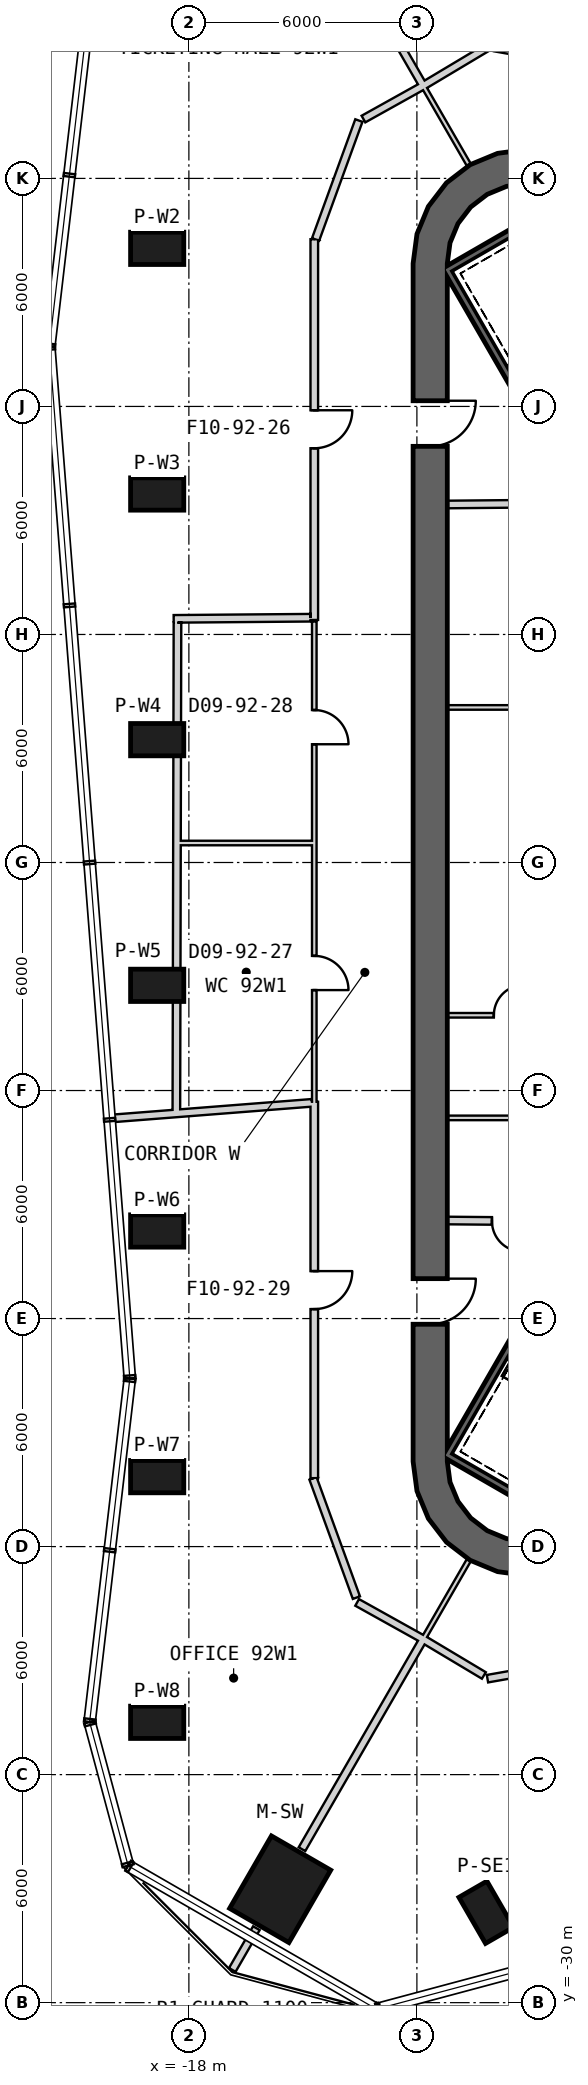
"""IFC4 building model, lengths in metres.
Left out: names, types, materials, properties, quantities, classifications, styles, units other than length and angle.
Written with IfcOpenShell. Run it as: python <this file> out.ifc"""

import sys

from ifc_helpers import new_model, si_unit, direction, frame, frame_2d, origin, origin_2d, place, context, subcontext, project, spatial, polyline, rectangle, outline, extrude, element, fill, save


model = new_model("IFC4")
c1 = context("Model", 3, precision=1e-05, world=origin(), true_north=direction((0.0, 1.0)))
c2 = subcontext(c1, "Body", "Model", "MODEL_VIEW")
j1 = project(units=[si_unit("LENGTHUNIT", "METRE"), si_unit("PLANEANGLEUNIT", "RADIAN")], contexts=[c1])
p1 = place(None, origin())
s1 = spatial("IfcSite", under=j1, at=p1, CompositionType="ELEMENT")
p2 = place(p1, origin())
s2 = spatial("IfcBuilding", under=s1, at=p2, CompositionType="ELEMENT")
p3 = place(p2, frame((0.0, 0.0, 404.8)))
s3 = spatial("IfcBuildingStorey", under=s2, at=p3, CompositionType="ELEMENT", Elevation=404.8)
p4 = place(p3, frame((-15.598, -27.016, 0.0), z_axis=(0.0, 0.0, 1.0), x_axis=(-0.5, -0.866025403784, 0.0)))
e1 = element("IfcColumn", 1, at=p4, inside=s3, PredefinedType="COLUMN", context=c2, shape_type="SweptSolid", body=[
    extrude(rectangle(XDim=2.2, YDim=1.8, at=origin_2d()), origin(), (0.0, 0.0, 1.0), 5.25),
])
for number, where, z_axis, x_axis in (
    (2, (-18.834, 16.16, 0.0), (0.0, 0.0, 1.0), (-1.0, 0.0, 0.0)),
    (3, (-18.834, 9.696, 0.0), (0.0, 0.0, 1.0), (-1.0, 0.0, 0.0)),
    (4, (-18.834, 3.232, 0.0), (0.0, 0.0, 1.0), (-1.0, 0.0, 0.0)),
    (5, (-18.834, -3.232, 0.0), (0.0, 0.0, 1.0), (-1.0, 0.0, 0.0)),
    (6, (-18.834, -9.696, 0.0), (0.0, 0.0, 1.0), (-1.0, 0.0, 0.0)),
    (7, (-18.834, -16.16, 0.0), (0.0, 0.0, 1.0), (-1.0, 0.0, 0.0)),
    (8, (-18.834, -22.624, 0.0), (0.0, 0.0, 1.0), (-1.0, 0.0, 0.0)),
    (9, (-10.176, -27.623, 0.0), (0.0, 0.0, 1.0), (0.5, -0.866, 0.0)),
):
    element("IfcColumn", number, at=place(p3, frame(where, z_axis=z_axis, x_axis=x_axis)), inside=s3, PredefinedType="COLUMN", context=c2, shape_type="SweptSolid", body=[
        extrude(rectangle(XDim=1.4, YDim=0.85, at=origin_2d()), origin(), (0.0, 0.0, 1.0), 5.25),
    ])
p5 = place(p3, frame((-11.65, 15.762, 0.0), z_axis=(0.0, 0.0, 1.0), x_axis=(0.0, -1.0, 0.0)))
e10 = element("IfcWall", 10, at=p5, inside=s3, PredefinedType="SHEAR", context=c2, shape_type="SweptSolid", body=[
    extrude(rectangle(XDim=31.523, YDim=0.9, at=frame_2d((15.762, 0.0))), origin(), (0.0, 0.0, 1.0), 5.5),
])
p6 = place(p5, frame((3.612, 0.0, 0.0)))
e11 = element("IfcOpeningElement", 11, at=p6, cuts=e10, PredefinedType="OPENING", context=c2, shape_type="SweptSolid", body=[
    extrude(rectangle(XDim=1.2, YDim=2.4, at=frame_2d((0.6, 1.2))), frame((0.0, 0.46, 0.0), z_axis=(0.0, -1.0, 0.0), x_axis=(1.0, 0.0, 0.0)), (0.0, 0.0, 1.0), 0.92),
])
p7 = place(p5, frame((26.712, 0.0, 0.0)))
e12 = element("IfcOpeningElement", 12, at=p7, cuts=e10, PredefinedType="OPENING", context=c2, shape_type="SweptSolid", body=[
    extrude(rectangle(XDim=1.2, YDim=2.4, at=frame_2d((0.6, 1.2))), frame((0.0, 0.46, 0.0), z_axis=(0.0, -1.0, 0.0), x_axis=(1.0, 0.0, 0.0)), (0.0, 0.0, 1.0), 0.92),
])
p8 = place(p3, origin())
e13 = element("IfcWall", 13, at=p8, inside=s3, PredefinedType="SHEAR", context=c2, shape_type="SweptSolid", body=[
    extrude(outline(polyline([(-7.6, 18.36), (-8.323, 18.659), (-9.1, 18.762), (-9.876, 18.659), (-10.6, 18.36), (-11.221, 17.883), (-11.698, 17.262), (-11.998, 16.538), (-12.1, 15.762), (-11.2, 15.762), (-11.128, 16.305), (-10.919, 16.812), (-10.585, 17.247), (-10.15, 17.58), (-9.644, 17.79), (-9.1, 17.862), (-8.556, 17.79), (-8.05, 17.58), (-7.6, 18.36)])), origin(), (0.0, 0.0, 1.0), 5.5),
])
p9 = place(p3, origin())
e14 = element("IfcWall", 14, at=p9, inside=s3, PredefinedType="SHEAR", context=c2, shape_type="SweptSolid", body=[
    extrude(outline(polyline([(-12.1, -15.762), (-11.998, -16.538), (-11.698, -17.262), (-11.221, -17.883), (-10.6, -18.36), (-9.876, -18.659), (-9.1, -18.762), (-8.323, -18.659), (-7.6, -18.36), (-8.05, -17.58), (-8.556, -17.79), (-9.1, -17.862), (-9.644, -17.79), (-10.15, -17.58), (-10.585, -17.247), (-10.919, -16.812), (-11.128, -16.305), (-11.2, -15.762), (-12.1, -15.762)])), origin(), (0.0, 0.0, 1.0), 5.5),
])
p10 = place(p3, frame((-11.245, 15.678, -0.3), z_axis=(0.0, 0.0, 1.0), x_axis=(0.499977274689, -0.866038523851, 0.0)))
e15 = element("IfcWall", 15, at=p10, inside=s3, PredefinedType="SHEAR", context=c2, shape_type="SweptSolid", body=[
    extrude(rectangle(XDim=8.1, YDim=0.2, at=frame_2d((4.05, 0.0))), origin(), (0.0, 0.0, 1.0), 5.55),
])
for number, where, z_axis, x_axis in (
    (16, (-7.818, 17.541, -0.3), (0.0, 0.0, 1.0), (-0.866, -0.5, 0.0)),
    (17, (-11.282, -15.541, -0.3), (0.0, 0.0, 1.0), (0.866, -0.5, 0.0)),
):
    element("IfcWall", number, at=place(p3, frame(where, z_axis=z_axis, x_axis=x_axis)), inside=s3, PredefinedType="SHEAR", context=c2, shape_type="SweptSolid", body=[
        extrude(rectangle(XDim=3.8, YDim=0.2, at=frame_2d((1.9, 0.0))), origin(), (0.0, 0.0, 1.0), 5.55),
    ])
p11 = place(p3, frame((-7.196, -8.663, -0.3), z_axis=(0.0, 0.0, 1.0), x_axis=(-0.499997992926, -0.866026562566, 0.0)))
e18 = element("IfcWall", 18, at=p11, inside=s3, PredefinedType="SHEAR", context=c2, shape_type="SweptSolid", body=[
    extrude(rectangle(XDim=7.9, YDim=0.2, at=frame_2d((3.95, 0.0))), origin(), (0.0, 0.0, 1.0), 5.55),
])
p12 = place(p3, frame((-7.95, 4.08, 0.0), z_axis=(0.0, 0.0, 1.0), x_axis=(-1.0, 0.0, 0.0)))
e19 = element("IfcWall", 19, at=p12, inside=s3, PredefinedType="PARTITIONING", context=c2, shape_type="SweptSolid", body=[
    extrude(rectangle(XDim=3.25, YDim=0.12, at=frame_2d((1.625, 0.0))), origin(), (0.0, 0.0, 1.0), 5.25),
])
p13 = place(p3, frame((-7.85, 9.451, 0.0), z_axis=(0.0, 0.0, 1.0), x_axis=(-0.999957167047, -0.009255488683, 0.0)))
e20 = element("IfcWall", 20, at=p13, inside=s3, PredefinedType="PARTITIONING", context=c2, shape_type="SweptSolid", body=[
    extrude(rectangle(XDim=3.35, YDim=0.2, at=frame_2d((1.675, 0.0))), origin(), (0.0, 0.0, 1.0), 5.25),
])
p14 = place(p3, frame((-11.2, -4.02, 0.0), z_axis=(0.0, 0.0, 1.0), x_axis=(1.0, 0.0, 0.0)))
e21 = element("IfcWall", 21, at=p14, inside=s3, PredefinedType="PARTITIONING", context=c2, shape_type="SweptSolid", body=[
    extrude(rectangle(XDim=3.25, YDim=0.12, at=frame_2d((1.625, 0.0))), origin(), (0.0, 0.0, 1.0), 5.25),
])
p15 = place(p14, frame((1.225, 0.0, 0.0)))
e22 = element("IfcOpeningElement", 22, at=p15, cuts=e21, PredefinedType="OPENING", context=c2, shape_type="SweptSolid", body=[
    extrude(rectangle(XDim=0.8, YDim=2.1, at=frame_2d((0.4, 1.05))), frame((0.0, 0.07, 0.0), z_axis=(0.0, -1.0, 0.0), x_axis=(1.0, 0.0, 0.0)), (0.0, 0.0, 1.0), 0.14),
])
p16 = place(p3, frame((-11.2, -6.72, 0.0), z_axis=(0.0, 0.0, 1.0), x_axis=(1.0, 0.0, 0.0)))
e23 = element("IfcWall", 23, at=p16, inside=s3, PredefinedType="PARTITIONING", context=c2, shape_type="SweptSolid", body=[
    extrude(rectangle(XDim=3.25, YDim=0.12, at=frame_2d((1.625, 0.0))), origin(), (0.0, 0.0, 1.0), 5.25),
])
p17 = place(p3, frame((-11.2, -9.42, 0.0), z_axis=(0.0, 0.0, 1.0), x_axis=(0.999957467379, -0.009222983926, 0.0)))
e24 = element("IfcWall", 24, at=p17, inside=s3, PredefinedType="PARTITIONING", context=c2, shape_type="SweptSolid", body=[
    extrude(rectangle(XDim=3.15, YDim=0.2, at=frame_2d((1.575, 0.0))), origin(), (0.0, 0.0, 1.0), 5.25),
])
p18 = place(p17, frame((1.175, 0.0, 0.0)))
e25 = element("IfcOpeningElement", 25, at=p18, cuts=e24, PredefinedType="OPENING", context=c2, shape_type="SweptSolid", body=[
    extrude(rectangle(XDim=0.8, YDim=2.1, at=frame_2d((0.4, 1.05))), frame((0.0, 0.11, 0.0), z_axis=(0.0, -1.0, 0.0), x_axis=(1.0, 0.0, 0.0)), (0.0, 0.0, 1.0), 0.22),
])
p19 = place(p3, frame((-14.7, 16.399, 0.0), z_axis=(0.0, 0.0, 1.0), x_axis=(0.0, -1.0, 0.0)))
e26 = element("IfcWall", 26, at=p19, inside=s3, PredefinedType="PARTITIONING", context=c2, shape_type="SweptSolid", body=[
    extrude(rectangle(XDim=10.018, YDim=0.2, at=frame_2d((5.009, 0.0))), origin(), (0.0, 0.0, 1.0), 5.25),
])
p20 = place(p19, frame((4.5, 0.0, 0.0)))
e27 = element("IfcOpeningElement", 27, at=p20, cuts=e26, PredefinedType="OPENING", context=c2, shape_type="SweptSolid", body=[
    extrude(rectangle(XDim=1.0, YDim=2.1, at=frame_2d((0.5, 1.05))), frame((0.0, 0.11, 0.0), z_axis=(0.0, -1.0, 0.0), x_axis=(1.0, 0.0, 0.0)), (0.0, 0.0, 1.0), 0.22),
])
p21 = place(p3, frame((-14.7, -6.295, 0.0), z_axis=(0.0, 0.0, 1.0), x_axis=(0.0, -1.0, 0.0)))
e28 = element("IfcWall", 28, at=p21, inside=s3, PredefinedType="PARTITIONING", context=c2, shape_type="SweptSolid", body=[
    extrude(rectangle(XDim=9.905, YDim=0.2, at=frame_2d((4.952, 0.0))), origin(), (0.0, 0.0, 1.0), 5.25),
])
p22 = place(p21, frame((4.456, 0.0, 0.0)))
e29 = element("IfcOpeningElement", 29, at=p22, cuts=e28, PredefinedType="OPENING", context=c2, shape_type="SweptSolid", body=[
    extrude(rectangle(XDim=1.0, YDim=2.1, at=frame_2d((0.5, 1.05))), frame((0.0, 0.11, 0.0), z_axis=(0.0, -1.0, 0.0), x_axis=(1.0, 0.0, 0.0)), (0.0, 0.0, 1.0), 0.22),
])
p23 = place(p3, frame((-13.527, 19.522, 0.0), z_axis=(0.0, 0.0, 1.0), x_axis=(-0.341978542333, -0.939707761266, 0.0)))
e30 = element("IfcWall", 30, at=p23, inside=s3, PredefinedType="PARTITIONING", context=c2, shape_type="SweptSolid", body=[
    extrude(rectangle(XDim=3.33, YDim=0.2, at=frame_2d((1.665, 0.0))), origin(), (0.0, 0.0, 1.0), 5.25),
])
p24 = place(p3, frame((-11.808, 20.452, 0.0), z_axis=(0.0, 0.0, 1.0), x_axis=(-0.873514477635, -0.486798169021, 0.0)))
e31 = element("IfcWall", 31, at=p24, inside=s3, PredefinedType="PARTITIONING", context=c2, shape_type="SweptSolid", body=[
    extrude(rectangle(XDim=1.83, YDim=0.2, at=frame_2d((0.915, 0.0))), origin(), (0.0, 0.0, 1.0), 3.02),
])
p25 = place(p3, frame((-14.7, 6.341, 0.0), z_axis=(0.0, 0.0, 1.0), x_axis=(0.0, -1.0, 0.0)))
e32 = element("IfcWall", 32, at=p25, inside=s3, PredefinedType="PARTITIONING", context=c2, shape_type="SweptSolid", body=[
    extrude(rectangle(XDim=5.829, YDim=0.12, at=frame_2d((2.914, 0.0))), origin(), (0.0, 0.0, 1.0), 5.25),
])
p26 = place(p25, frame((2.33, 0.0, 0.0)))
e33 = element("IfcOpeningElement", 33, at=p26, cuts=e32, PredefinedType="OPENING", context=c2, shape_type="SweptSolid", body=[
    extrude(rectangle(XDim=0.9, YDim=2.1, at=frame_2d((0.45, 1.05))), frame((0.0, 0.07, 0.0), z_axis=(0.0, -1.0, 0.0), x_axis=(1.0, 0.0, 0.0)), (0.0, 0.0, 1.0), 0.14),
])
p27 = place(p3, frame((-14.7, 0.513, 0.0), z_axis=(0.0, 0.0, 1.0), x_axis=(0.0, -1.0, 0.0)))
e34 = element("IfcWall", 34, at=p27, inside=s3, PredefinedType="PARTITIONING", context=c2, shape_type="SweptSolid", body=[
    extrude(rectangle(XDim=6.808, YDim=0.12, at=frame_2d((3.404, 0.0))), origin(), (0.0, 0.0, 1.0), 5.25),
])
p28 = place(p27, frame((2.97, 0.0, 0.0)))
e35 = element("IfcOpeningElement", 35, at=p28, cuts=e34, PredefinedType="OPENING", context=c2, shape_type="SweptSolid", body=[
    extrude(rectangle(XDim=0.9, YDim=2.1, at=frame_2d((0.45, 1.05))), frame((0.0, 0.07, 0.0), z_axis=(0.0, -1.0, 0.0), x_axis=(1.0, 0.0, 0.0)), (0.0, 0.0, 1.0), 0.14),
])
p29 = place(p3, frame((-13.572, -19.469, 0.0), z_axis=(0.0, 0.0, 1.0), x_axis=(0.873512168958, -0.486802311707, 0.0)))
e36 = element("IfcWall", 36, at=p29, inside=s3, PredefinedType="PARTITIONING", context=c2, shape_type="SweptSolid", body=[
    extrude(rectangle(XDim=2.02, YDim=0.2, at=frame_2d((1.01, 0.0))), origin(), (0.0, 0.0, 1.0), 3.02),
])
p30 = place(p3, frame((-14.734, -16.206, 0.0), z_axis=(0.0, 0.0, 1.0), x_axis=(0.342013079247, -0.93969519187, 0.0)))
e37 = element("IfcWall", 37, at=p30, inside=s3, PredefinedType="PARTITIONING", context=c2, shape_type="SweptSolid", body=[
    extrude(rectangle(XDim=3.339, YDim=0.2, at=frame_2d((1.67, 0.0))), origin(), (0.0, 0.0, 1.0), 5.25),
])
for number, where, z_axis, x_axis in (
    (38, (-11.849, 20.463, 0.0), (0.0, 0.0, 1.0), (0.5, -0.866, 0.0)),
    (39, (-10.549, -18.212, 0.0), (0.0, 0.0, 1.0), (-0.5, -0.866, 0.0)),
):
    element("IfcWall", number, at=place(p3, frame(where, z_axis=z_axis, x_axis=x_axis)), inside=s3, PredefinedType="PARTITIONING", context=c2, shape_type="SweptSolid", body=[
        extrude(rectangle(XDim=2.6, YDim=0.12, at=frame_2d((1.3, 0.0))), origin(), (0.0, 0.0, 1.0), 3.02),
    ])
p31 = place(p3, frame((-18.3, 6.312, 0.0), z_axis=(0.0, 0.0, 1.0), x_axis=(-0.002282237823, -0.999997395692, 0.0)))
e40 = element("IfcWall", 40, at=p31, inside=s3, PredefinedType="PARTITIONING", context=c2, shape_type="SweptSolid", body=[
    extrude(rectangle(XDim=12.944, YDim=0.2, at=frame_2d((6.472, 0.0))), origin(), (0.0, 0.0, 1.0), 5.25),
])
p32 = place(p3, frame((-18.4, 6.411, 0.0), z_axis=(0.0, 0.0, 1.0), x_axis=(0.999965208912, 0.008341520563, 0.0)))
e41 = element("IfcWall", 41, at=p32, inside=s3, PredefinedType="PARTITIONING", context=c2, shape_type="SweptSolid", body=[
    extrude(rectangle(XDim=3.6, YDim=0.2, at=frame_2d((1.8, 0.0))), origin(), (0.0, 0.0, 1.0), 5.25),
])
p33 = place(p3, frame((-20.087, -6.74, 0.0), z_axis=(0.0, 0.0, 1.0), x_axis=(0.996972211826, 0.077758657691, 0.0)))
e42 = element("IfcWall", 42, at=p33, inside=s3, PredefinedType="PARTITIONING", context=c2, shape_type="SweptSolid", body=[
    extrude(rectangle(XDim=1.793, YDim=0.2, at=frame_2d((0.896, 0.0))), origin(), (0.0, 0.0, 1.0), 5.25),
])
p34 = place(p3, frame((-11.849, 20.463, 0.0), z_axis=(0.0, 0.0, 1.0), x_axis=(-0.499993152284, 0.866029357279, 0.0)))
e43 = element("IfcWall", 43, at=p34, inside=s3, PredefinedType="PARTITIONING", context=c2, shape_type="SweptSolid", body=[
    extrude(rectangle(XDim=6.35, YDim=0.2, at=frame_2d((3.175, 0.0))), origin(), (0.0, 0.0, 1.0), 3.02),
])
p35 = place(p3, frame((-14.76, 0.513, 0.0), z_axis=(0.0, 0.0, 1.0), x_axis=(-1.0, 0.0, 0.0)))
e44 = element("IfcWall", 44, at=p35, inside=s3, PredefinedType="PARTITIONING", context=c2, shape_type="SweptSolid", body=[
    extrude(rectangle(XDim=3.54, YDim=0.12, at=frame_2d((1.77, 0.0))), origin(), (0.0, 0.0, 1.0), 5.25),
])
p36 = place(p3, frame((-14.76, -6.324, 0.0), z_axis=(0.0, 0.0, 1.0), x_axis=(-0.99696647774, -0.077832141573, 0.0)))
e45 = element("IfcWall", 45, at=p36, inside=s3, PredefinedType="PARTITIONING", context=c2, shape_type="SweptSolid", body=[
    extrude(rectangle(XDim=3.551, YDim=0.2, at=frame_2d((1.775, 0.0))), origin(), (0.0, 0.0, 1.0), 5.25),
])
p37 = place(p3, frame((-11.849, -20.463, 0.0), z_axis=(0.0, 0.0, 1.0), x_axis=(-0.499993152284, -0.866029357279, 0.0)))
e46 = element("IfcWall", 46, at=p37, inside=s3, PredefinedType="PARTITIONING", context=c2, shape_type="SweptSolid", body=[
    extrude(rectangle(XDim=6.35, YDim=0.2, at=frame_2d((3.175, 0.0))), origin(), (0.0, 0.0, 1.0), 3.02),
])
p38 = place(p3, frame((-16.224, -28.041, 0.0), z_axis=(0.0, 0.0, 1.0), x_axis=(-0.499950289094, -0.866054102487, 0.0)))
e47 = element("IfcWall", 47, at=p38, inside=s3, PredefinedType="PARTITIONING", context=c2, shape_type="SweptSolid", body=[
    extrude(rectangle(XDim=1.268, YDim=0.2, at=frame_2d((0.634, 0.0))), origin(), (0.0, 0.0, 1.0), 5.25),
])
p39 = place(p3, frame((-10.074, 21.489, 0.0), z_axis=(0.0, 0.0, 1.0), x_axis=(-0.858323699828, -0.513108591152, 0.0)))
e48 = element("IfcWall", 48, at=p39, inside=s3, PredefinedType="PARTITIONING", context=c2, shape_type="SweptSolid", body=[
    extrude(rectangle(XDim=2.02, YDim=0.2, at=frame_2d((1.01, 0.0))), origin(), (0.0, 0.0, 1.0), 3.02),
])
p40 = place(p3, frame((-6.667, 20.863, 0.0), z_axis=(0.0, 0.0, 1.0), x_axis=(-0.984809308694, 0.173639354725, 0.0)))
e49 = element("IfcWall", 49, at=p40, inside=s3, PredefinedType="PARTITIONING", context=c2, shape_type="SweptSolid", body=[
    extrude(rectangle(XDim=3.339, YDim=0.2, at=frame_2d((1.67, 0.0))), origin(), (0.0, 0.0, 1.0), 5.25),
])
p41 = place(p3, frame((-10.143, -21.476, 0.0), z_axis=(0.0, 0.0, 1.0), x_axis=(0.98480864774, 0.173643103339, 0.0)))
e50 = element("IfcWall", 50, at=p41, inside=s3, PredefinedType="PARTITIONING", context=c2, shape_type="SweptSolid", body=[
    extrude(rectangle(XDim=3.329, YDim=0.2, at=frame_2d((1.665, 0.0))), origin(), (0.0, 0.0, 1.0), 5.25),
])
p42 = place(p3, frame((-11.808, -20.452, 0.0), z_axis=(0.0, 0.0, 1.0), x_axis=(0.858362923554, -0.51304297234, 0.0)))
e51 = element("IfcWall", 51, at=p42, inside=s3, PredefinedType="PARTITIONING", context=c2, shape_type="SweptSolid", body=[
    extrude(rectangle(XDim=1.83, YDim=0.2, at=frame_2d((0.915, 0.0))), origin(), (0.0, 0.0, 1.0), 3.02),
])
p43 = place(p15, origin())
e52 = element("IfcDoor", 52, at=p43, inside=s3, OperationType="SINGLE_SWING_RIGHT", PredefinedType="USERDEFINED", context=c2, shape_type="SweptSolid", body=[
    extrude(rectangle(XDim=0.8, YDim=2.1, at=frame_2d((0.4, 1.05))), frame((0.0, 0.025, 0.0), z_axis=(0.0, -1.0, 0.0), x_axis=(1.0, 0.0, 0.0)), (0.0, 0.0, 1.0), 0.05),
])
fill(e22, e52)
p44 = place(p18, origin())
e53 = element("IfcDoor", 53, at=p44, inside=s3, OperationType="SINGLE_SWING_RIGHT", PredefinedType="USERDEFINED", context=c2, shape_type="SweptSolid", body=[
    extrude(rectangle(XDim=0.8, YDim=2.1, at=frame_2d((0.4, 1.05))), frame((0.0, 0.025, 0.0), z_axis=(0.0, -1.0, 0.0), x_axis=(1.0, 0.0, 0.0)), (0.0, 0.0, 1.0), 0.05),
])
fill(e25, e53)
p45 = place(p20, origin())
e54 = element("IfcDoor", 54, at=p45, inside=s3, OperationType="SINGLE_SWING_LEFT", PredefinedType="USERDEFINED", context=c2, shape_type="SweptSolid", body=[
    extrude(rectangle(XDim=1.0, YDim=2.1, at=frame_2d((0.5, 1.05))), frame((0.0, 0.025, 0.0), z_axis=(0.0, -1.0, 0.0), x_axis=(1.0, 0.0, 0.0)), (0.0, 0.0, 1.0), 0.05),
])
fill(e27, e54)
p46 = place(p28, origin())
e55 = element("IfcDoor", 55, at=p46, inside=s3, OperationType="SINGLE_SWING_RIGHT", PredefinedType="NOTDEFINED", context=c2, shape_type="SweptSolid", body=[
    extrude(rectangle(XDim=0.9, YDim=2.1, at=frame_2d((0.45, 1.05))), frame((0.0, 0.025, 0.0), z_axis=(0.0, -1.0, 0.0), x_axis=(1.0, 0.0, 0.0)), (0.0, 0.0, 1.0), 0.05),
])
fill(e35, e55)
p47 = place(p26, origin())
e56 = element("IfcDoor", 56, at=p47, inside=s3, OperationType="SINGLE_SWING_RIGHT", PredefinedType="NOTDEFINED", context=c2, shape_type="SweptSolid", body=[
    extrude(rectangle(XDim=0.9, YDim=2.1, at=frame_2d((0.45, 1.05))), frame((0.0, 0.025, 0.0), z_axis=(0.0, -1.0, 0.0), x_axis=(1.0, 0.0, 0.0)), (0.0, 0.0, 1.0), 0.05),
])
fill(e33, e56)
p48 = place(p22, origin())
e57 = element("IfcDoor", 57, at=p48, inside=s3, OperationType="SINGLE_SWING_LEFT", PredefinedType="USERDEFINED", context=c2, shape_type="SweptSolid", body=[
    extrude(rectangle(XDim=1.0, YDim=2.1, at=frame_2d((0.5, 1.05))), frame((0.0, 0.025, 0.0), z_axis=(0.0, -1.0, 0.0), x_axis=(1.0, 0.0, 0.0)), (0.0, 0.0, 1.0), 0.05),
])
fill(e29, e57)
p49 = place(p6, origin())
e58 = element("IfcDoor", 58, at=p49, inside=s3, OperationType="SINGLE_SWING_LEFT", PredefinedType="USERDEFINED", context=c2, shape_type="SweptSolid", body=[
    extrude(rectangle(XDim=1.2, YDim=2.4, at=frame_2d((0.6, 1.2))), frame((0.0, 0.025, 0.0), z_axis=(0.0, -1.0, 0.0), x_axis=(1.0, 0.0, 0.0)), (0.0, 0.0, 1.0), 0.05),
])
fill(e11, e58)
p50 = place(p7, origin())
e59 = element("IfcDoor", 59, at=p50, inside=s3, OperationType="SINGLE_SWING_LEFT", PredefinedType="USERDEFINED", context=c2, shape_type="SweptSolid", body=[
    extrude(rectangle(XDim=1.2, YDim=2.4, at=frame_2d((0.6, 1.2))), frame((0.0, 0.025, 0.0), z_axis=(0.0, -1.0, 0.0), x_axis=(1.0, 0.0, 0.0)), (0.0, 0.0, 1.0), 0.05),
])
fill(e12, e59)
save(model, sys.argv[1])
